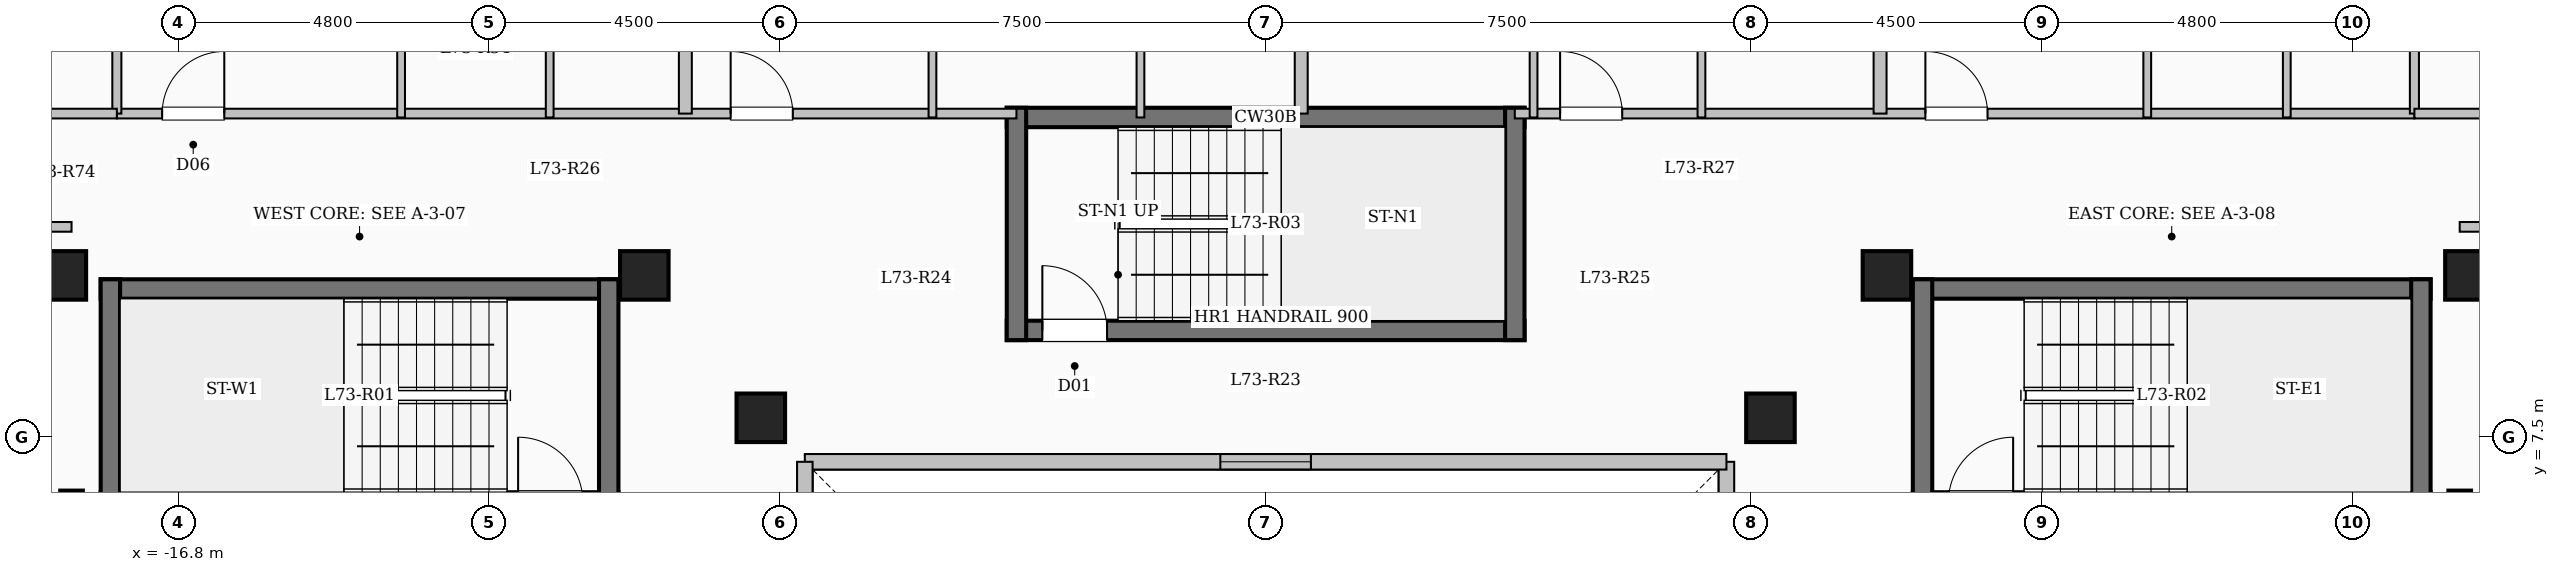
"""IFC4 building model, lengths in metres.
Left out: names, types, materials, properties, quantities, classifications, styles, units other than length and angle.
Written with IfcOpenShell. Run it as: python <this file> out.ifc"""

import sys

from ifc_helpers import new_model, si_unit, direction, frame, frame_2d, origin, origin_2d, place, context, subcontext, project, spatial, rectangle, extrude, element, fill, save


model = new_model("IFC4")
c1 = context("Model", 3, precision=1e-05, world=origin(), true_north=direction((0.0, 1.0)))
c2 = subcontext(c1, "Body", "Model", "MODEL_VIEW")
j1 = project(units=[si_unit("LENGTHUNIT", "METRE"), si_unit("PLANEANGLEUNIT", "RADIAN")], contexts=[c1])
p1 = place(None, origin())
s1 = spatial("IfcSite", under=j1, at=p1, CompositionType="ELEMENT")
p2 = place(p1, origin())
s2 = spatial("IfcBuilding", under=s1, at=p2, CompositionType="ELEMENT")
p3 = place(p2, frame((0.0, 0.0, 268.3)))
s3 = spatial("IfcBuildingStorey", under=s2, at=p3, CompositionType="ELEMENT", Elevation=268.3)
for number, where, z_axis, x_axis in (
    (1, (-7.8, 7.8, 0.0), (0.0, 0.0, 1.0), (1.0, 0.0, 0.0)),
    (2, (7.8, 7.8, 0.0), (0.0, 0.0, 1.0), (1.0, 0.0, 0.0)),
    (3, (-9.6, 10.0, 0.0), (0.0, 0.0, 1.0), (1.0, 0.0, 0.0)),
    (4, (9.6, 10.0, 0.0), (0.0, 0.0, 1.0), (1.0, 0.0, 0.0)),
    (5, (-18.6, 10.0, 0.0), (0.0, 0.0, 1.0), (1.0, 0.0, 0.0)),
    (6, (18.6, 10.0, 0.0), (0.0, 0.0, 1.0), (1.0, 0.0, 0.0)),
):
    element("IfcColumn", number, at=place(p3, frame(where, z_axis=z_axis, x_axis=x_axis)), inside=s3, PredefinedType="COLUMN", context=c2, shape_type="SweptSolid", body=[
        extrude(rectangle(XDim=0.75, YDim=0.75, at=origin_2d()), origin(), (0.0, 0.0, 1.0), 3.35),
    ])
p4 = place(p3, frame((7.12, -7.12, 0.0), z_axis=(0.0, 0.0, 1.0), x_axis=(0.0, 1.0, 0.0)))
e7 = element("IfcWall", 7, at=p4, inside=s3, PredefinedType="SOLIDWALL", context=c2, shape_type="SweptSolid", body=[
    extrude(rectangle(XDim=14.24, YDim=0.24, at=frame_2d((7.12, 0.0))), origin(), (0.0, 0.0, 1.0), 3.05),
])
p5 = place(p4, frame((6.42, 0.0, 0.95)))
e8 = element("IfcOpeningElement", 8, at=p5, cuts=e7, PredefinedType="OPENING", context=c2, shape_type="SweptSolid", body=[
    extrude(rectangle(XDim=1.4, YDim=1.5, at=frame_2d((0.7, 0.75))), frame((0.0, 0.13, 0.0), z_axis=(0.0, -1.0, 0.0), x_axis=(1.0, 0.0, 0.0)), (0.0, 0.0, 1.0), 0.26),
])
p6 = place(p3, frame((7.12, 7.12, 0.0), z_axis=(0.0, 0.0, 1.0), x_axis=(-1.0, 0.0, 0.0)))
e9 = element("IfcWall", 9, at=p6, inside=s3, PredefinedType="SOLIDWALL", context=c2, shape_type="SweptSolid", body=[
    extrude(rectangle(XDim=14.24, YDim=0.24, at=frame_2d((7.12, 0.0))), origin(), (0.0, 0.0, 1.0), 3.05),
])
p7 = place(p6, frame((6.42, 0.0, 0.95)))
e10 = element("IfcOpeningElement", 10, at=p7, cuts=e9, PredefinedType="OPENING", context=c2, shape_type="SweptSolid", body=[
    extrude(rectangle(XDim=1.4, YDim=1.5, at=frame_2d((0.7, 0.75))), frame((0.0, 0.13, 0.0), z_axis=(0.0, -1.0, 0.0), x_axis=(1.0, 0.0, 0.0)), (0.0, 0.0, 1.0), 0.26),
])
p8 = place(p3, frame((-7.12, 7.12, 0.0), z_axis=(0.0, 0.0, 1.0), x_axis=(0.0, -1.0, 0.0)))
e11 = element("IfcWall", 11, at=p8, inside=s3, PredefinedType="SOLIDWALL", context=c2, shape_type="SweptSolid", body=[
    extrude(rectangle(XDim=14.24, YDim=0.24, at=frame_2d((7.12, 0.0))), origin(), (0.0, 0.0, 1.0), 3.05),
])
p9 = place(p8, frame((6.42, 0.0, 0.95)))
e12 = element("IfcOpeningElement", 12, at=p9, cuts=e11, PredefinedType="OPENING", context=c2, shape_type="SweptSolid", body=[
    extrude(rectangle(XDim=1.4, YDim=1.5, at=frame_2d((0.7, 0.75))), frame((0.0, 0.13, 0.0), z_axis=(0.0, -1.0, 0.0), x_axis=(1.0, 0.0, 0.0)), (0.0, 0.0, 1.0), 0.26),
])
p10 = place(p3, frame((-18.0, 9.79, 0.0), z_axis=(0.0, 0.0, 1.0), x_axis=(1.0, 0.0, 0.0)))
e13 = element("IfcWall", 13, at=p10, inside=s3, PredefinedType="SHEAR", context=c2, shape_type="SweptSolid", body=[
    extrude(rectangle(XDim=8.0, YDim=0.3, at=frame_2d((4.0, 0.0))), origin(), (0.0, 0.0, 1.0), 3.35),
])
p11 = place(p3, frame((-18.0, 6.5, 0.0), z_axis=(0.0, 0.0, 1.0), x_axis=(1.0, 0.0, 0.0)))
e14 = element("IfcWall", 14, at=p11, inside=s3, PredefinedType="SHEAR", context=c2, shape_type="SweptSolid", body=[
    extrude(rectangle(XDim=8.0, YDim=0.3, at=frame_2d((4.0, 0.0))), origin(), (0.0, 0.0, 1.0), 3.35),
])
p12 = place(p11, frame((6.45, 0.0, 0.0)))
e15 = element("IfcOpeningElement", 15, at=p12, cuts=e14, PredefinedType="OPENING", context=c2, shape_type="SweptSolid", body=[
    extrude(rectangle(XDim=1.0, YDim=2.15, at=frame_2d((0.5, 1.075))), frame((0.0, 0.16, 0.0), z_axis=(0.0, -1.0, 0.0), x_axis=(1.0, 0.0, 0.0)), (0.0, 0.0, 1.0), 0.32),
])
for number, where, z_axis, x_axis in (
    (16, (-17.85, 6.35, 0.0), (0.0, 0.0, 1.0), (0.0, 1.0, 0.0)),
    (17, (-10.15, 6.35, 0.0), (0.0, 0.0, 1.0), (0.0, 1.0, 0.0)),
):
    element("IfcWall", number, at=place(p3, frame(where, z_axis=z_axis, x_axis=x_axis)), inside=s3, PredefinedType="SHEAR", context=c2, shape_type="SweptSolid", body=[
        extrude(rectangle(XDim=3.59, YDim=0.3, at=frame_2d((1.795, 0.0))), origin(), (0.0, 0.0, 1.0), 3.35),
    ])
p13 = place(p3, frame((10.0, 9.79, 0.0), z_axis=(0.0, 0.0, 1.0), x_axis=(1.0, 0.0, 0.0)))
e18 = element("IfcWall", 18, at=p13, inside=s3, PredefinedType="SHEAR", context=c2, shape_type="SweptSolid", body=[
    extrude(rectangle(XDim=8.0, YDim=0.3, at=frame_2d((4.0, 0.0))), origin(), (0.0, 0.0, 1.0), 3.35),
])
p14 = place(p3, frame((10.0, 6.5, 0.0), z_axis=(0.0, 0.0, 1.0), x_axis=(1.0, 0.0, 0.0)))
e19 = element("IfcWall", 19, at=p14, inside=s3, PredefinedType="SHEAR", context=c2, shape_type="SweptSolid", body=[
    extrude(rectangle(XDim=8.0, YDim=0.3, at=frame_2d((4.0, 0.0))), origin(), (0.0, 0.0, 1.0), 3.35),
])
p15 = place(p14, frame((0.55, 0.0, 0.0)))
e20 = element("IfcOpeningElement", 20, at=p15, cuts=e19, PredefinedType="OPENING", context=c2, shape_type="SweptSolid", body=[
    extrude(rectangle(XDim=1.0, YDim=2.15, at=frame_2d((0.5, 1.075))), frame((0.0, 0.16, 0.0), z_axis=(0.0, -1.0, 0.0), x_axis=(1.0, 0.0, 0.0)), (0.0, 0.0, 1.0), 0.32),
])
for number, where, z_axis, x_axis in (
    (21, (10.15, 6.35, 0.0), (0.0, 0.0, 1.0), (0.0, 1.0, 0.0)),
    (22, (17.85, 6.35, 0.0), (0.0, 0.0, 1.0), (0.0, 1.0, 0.0)),
):
    element("IfcWall", number, at=place(p3, frame(where, z_axis=z_axis, x_axis=x_axis)), inside=s3, PredefinedType="SHEAR", context=c2, shape_type="SweptSolid", body=[
        extrude(rectangle(XDim=3.59, YDim=0.3, at=frame_2d((1.795, 0.0))), origin(), (0.0, 0.0, 1.0), 3.35),
    ])
p16 = place(p3, frame((-4.0, 12.44, 0.0), z_axis=(0.0, 0.0, 1.0), x_axis=(1.0, 0.0, 0.0)))
e23 = element("IfcWall", 23, at=p16, inside=s3, PredefinedType="SHEAR", context=c2, shape_type="SweptSolid", body=[
    extrude(rectangle(XDim=8.0, YDim=0.3, at=frame_2d((4.0, 0.0))), origin(), (0.0, 0.0, 1.0), 3.35),
])
p17 = place(p3, frame((-4.0, 9.15, 0.0), z_axis=(0.0, 0.0, 1.0), x_axis=(1.0, 0.0, 0.0)))
e24 = element("IfcWall", 24, at=p17, inside=s3, PredefinedType="SHEAR", context=c2, shape_type="SweptSolid", body=[
    extrude(rectangle(XDim=8.0, YDim=0.3, at=frame_2d((4.0, 0.0))), origin(), (0.0, 0.0, 1.0), 3.35),
])
p18 = place(p17, frame((0.55, 0.0, 0.0)))
e25 = element("IfcOpeningElement", 25, at=p18, cuts=e24, PredefinedType="OPENING", context=c2, shape_type="SweptSolid", body=[
    extrude(rectangle(XDim=1.0, YDim=2.15, at=frame_2d((0.5, 1.075))), frame((0.0, 0.16, 0.0), z_axis=(0.0, -1.0, 0.0), x_axis=(1.0, 0.0, 0.0)), (0.0, 0.0, 1.0), 0.32),
])
for number, where, z_axis, x_axis in (
    (26, (-3.85, 9.0, 0.0), (0.0, 0.0, 1.0), (0.0, 1.0, 0.0)),
    (27, (3.85, 9.0, 0.0), (0.0, 0.0, 1.0), (0.0, 1.0, 0.0)),
):
    element("IfcWall", number, at=place(p3, frame(where, z_axis=z_axis, x_axis=x_axis)), inside=s3, PredefinedType="SHEAR", context=c2, shape_type="SweptSolid", body=[
        extrude(rectangle(XDim=3.59, YDim=0.3, at=frame_2d((1.795, 0.0))), origin(), (0.0, 0.0, 1.0), 3.35),
    ])
for number, where, z_axis, x_axis in (
    (28, (-18.45, -7.375, 0.0), (0.0, 0.0, 1.0), (0.0, 1.0, 0.0)),
    (29, (18.45, -7.375, 0.0), (0.0, 0.0, 1.0), (0.0, 1.0, 0.0)),
):
    element("IfcWall", number, at=place(p3, frame(where, z_axis=z_axis, x_axis=x_axis)), inside=s3, PredefinedType="SHEAR", context=c2, shape_type="SweptSolid", body=[
        extrude(rectangle(XDim=14.05, YDim=0.35, at=frame_2d((7.025, 0.0))), origin(), (0.0, 0.0, 1.0), 3.35),
    ])
p19 = place(p3, frame((-17.75, 12.5, 0.0), z_axis=(0.0, 0.0, 1.0), x_axis=(1.0, 0.0, 0.0)))
e30 = element("IfcWall", 30, at=p19, inside=s3, PredefinedType="PARTITIONING", context=c2, shape_type="SweptSolid", body=[
    extrude(rectangle(XDim=13.9, YDim=0.15, at=frame_2d((6.95, 0.0))), origin(), (0.0, 0.0, 1.0), 3.05),
])
p20 = place(p19, frame((0.7, 0.0, 0.0)))
e31 = element("IfcOpeningElement", 31, at=p20, cuts=e30, PredefinedType="OPENING", context=c2, shape_type="SweptSolid", body=[
    extrude(rectangle(XDim=0.96, YDim=2.15, at=frame_2d((0.48, 1.075))), frame((0.0, 0.085, 0.0), z_axis=(0.0, -1.0, 0.0), x_axis=(1.0, 0.0, 0.0)), (0.0, 0.0, 1.0), 0.17),
])
p21 = place(p19, frame((9.484, 0.0, 0.0)))
e32 = element("IfcOpeningElement", 32, at=p21, cuts=e30, PredefinedType="OPENING", context=c2, shape_type="SweptSolid", body=[
    extrude(rectangle(XDim=0.96, YDim=2.15, at=frame_2d((0.48, 1.075))), frame((0.0, 0.085, 0.0), z_axis=(0.0, -1.0, 0.0), x_axis=(1.0, 0.0, 0.0)), (0.0, 0.0, 1.0), 0.17),
])
p22 = place(p3, frame((3.85, 12.5, 0.0), z_axis=(0.0, 0.0, 1.0), x_axis=(1.0, 0.0, 0.0)))
e33 = element("IfcWall", 33, at=p22, inside=s3, PredefinedType="PARTITIONING", context=c2, shape_type="SweptSolid", body=[
    extrude(rectangle(XDim=13.9, YDim=0.15, at=frame_2d((6.95, 0.0))), origin(), (0.0, 0.0, 1.0), 3.05),
])
p23 = place(p22, frame((0.7, 0.0, 0.0)))
e34 = element("IfcOpeningElement", 34, at=p23, cuts=e33, PredefinedType="OPENING", context=c2, shape_type="SweptSolid", body=[
    extrude(rectangle(XDim=0.96, YDim=2.15, at=frame_2d((0.48, 1.075))), frame((0.0, 0.085, 0.0), z_axis=(0.0, -1.0, 0.0), x_axis=(1.0, 0.0, 0.0)), (0.0, 0.0, 1.0), 0.17),
])
p24 = place(p22, frame((6.344, 0.0, 0.0)))
e35 = element("IfcOpeningElement", 35, at=p24, cuts=e33, PredefinedType="OPENING", context=c2, shape_type="SweptSolid", body=[
    extrude(rectangle(XDim=0.96, YDim=2.15, at=frame_2d((0.48, 1.075))), frame((0.0, 0.085, 0.0), z_axis=(0.0, -1.0, 0.0), x_axis=(1.0, 0.0, 0.0)), (0.0, 0.0, 1.0), 0.17),
])
p25 = place(p3, frame((0.55, 12.5, 0.0), z_axis=(0.0, 0.0, 1.0), x_axis=(0.0, 1.0, 0.0)))
e36 = element("IfcWall", 36, at=p25, inside=s3, PredefinedType="SOLIDWALL", context=c2, shape_type="SweptSolid", body=[
    extrude(rectangle(XDim=9.88, YDim=0.2, at=frame_2d((4.94, 0.0))), origin(), (0.0, 0.0, 1.0), 3.05),
])
p26 = place(p3, frame((-8.966, 12.5, 0.0), z_axis=(0.0, 0.0, 1.0), x_axis=(0.0, 1.0, 0.0)))
e37 = element("IfcWall", 37, at=p26, inside=s3, PredefinedType="SOLIDWALL", context=c2, shape_type="SweptSolid", body=[
    extrude(rectangle(XDim=8.902, YDim=0.2, at=frame_2d((4.451, 0.0))), origin(), (0.0, 0.0, 1.0), 3.05),
])
p27 = place(p3, frame((-13.358, 12.44, 0.0), z_axis=(0.0, 0.0, 1.0), x_axis=(0.0, 1.0, 0.0)))
e38 = element("IfcWall", 38, at=p27, inside=s3, PredefinedType="PARTITIONING", context=c2, shape_type="SweptSolid", body=[
    extrude(rectangle(XDim=8.46, YDim=0.12, at=frame_2d((4.23, 0.0))), origin(), (0.0, 0.0, 1.0), 3.05),
])
p28 = place(p27, frame((2.905, 0.0, 0.0)))
e39 = element("IfcOpeningElement", 39, at=p28, cuts=e38, PredefinedType="OPENING", context=c2, shape_type="SweptSolid", body=[
    extrude(rectangle(XDim=1.08, YDim=2.15, at=frame_2d((0.54, 1.075))), frame((0.0, 0.07, 0.0), z_axis=(0.0, -1.0, 0.0), x_axis=(1.0, 0.0, 0.0)), (0.0, 0.0, 1.0), 0.14),
])
p29 = place(p3, frame((-11.062, 12.44, 0.0), z_axis=(0.0, 0.0, 1.0), x_axis=(0.0, 1.0, 0.0)))
e40 = element("IfcWall", 40, at=p29, inside=s3, PredefinedType="PARTITIONING", context=c2, shape_type="SweptSolid", body=[
    extrude(rectangle(XDim=2.62, YDim=0.12, at=frame_2d((1.31, 0.0))), origin(), (0.0, 0.0, 1.0), 3.05),
])
p30 = place(p3, frame((-5.148, 12.44, 0.0), z_axis=(0.0, 0.0, 1.0), x_axis=(0.0, 1.0, 0.0)))
e41 = element("IfcWall", 41, at=p30, inside=s3, PredefinedType="PARTITIONING", context=c2, shape_type="SweptSolid", body=[
    extrude(rectangle(XDim=9.903, YDim=0.12, at=frame_2d((4.952, 0.0))), origin(), (0.0, 0.0, 1.0), 3.05),
])
p31 = place(p30, frame((3.075, 0.0, 0.0)))
e42 = element("IfcOpeningElement", 42, at=p31, cuts=e41, PredefinedType="OPENING", context=c2, shape_type="SweptSolid", body=[
    extrude(rectangle(XDim=1.08, YDim=2.15, at=frame_2d((0.54, 1.075))), frame((0.0, 0.07, 0.0), z_axis=(0.0, -1.0, 0.0), x_axis=(1.0, 0.0, 0.0)), (0.0, 0.0, 1.0), 0.14),
])
p32 = place(p3, frame((-1.934, 12.44, 0.0), z_axis=(0.0, 0.0, 1.0), x_axis=(0.0, 1.0, 0.0)))
e43 = element("IfcWall", 43, at=p32, inside=s3, PredefinedType="PARTITIONING", context=c2, shape_type="SweptSolid", body=[
    extrude(rectangle(XDim=2.79, YDim=0.12, at=frame_2d((1.395, 0.0))), origin(), (0.0, 0.0, 1.0), 3.05),
])
p33 = place(p3, frame((9.494, 12.5, 0.0), z_axis=(0.0, 0.0, 1.0), x_axis=(0.0, 1.0, 0.0)))
e44 = element("IfcWall", 44, at=p33, inside=s3, PredefinedType="SOLIDWALL", context=c2, shape_type="SweptSolid", body=[
    extrude(rectangle(XDim=8.771, YDim=0.2, at=frame_2d((4.385, 0.0))), origin(), (0.0, 0.0, 1.0), 3.05),
])
p34 = place(p3, frame((4.14, 12.44, 0.0), z_axis=(0.0, 0.0, 1.0), x_axis=(0.0, 1.0, 0.0)))
e45 = element("IfcWall", 45, at=p34, inside=s3, PredefinedType="PARTITIONING", context=c2, shape_type="SweptSolid", body=[
    extrude(rectangle(XDim=9.94, YDim=0.12, at=frame_2d((4.97, 0.0))), origin(), (0.0, 0.0, 1.0), 3.05),
])
p35 = place(p34, frame((3.245, 0.0, 0.0)))
e46 = element("IfcOpeningElement", 46, at=p35, cuts=e45, PredefinedType="OPENING", context=c2, shape_type="SweptSolid", body=[
    extrude(rectangle(XDim=1.08, YDim=2.15, at=frame_2d((0.54, 1.075))), frame((0.0, 0.07, 0.0), z_axis=(0.0, -1.0, 0.0), x_axis=(1.0, 0.0, 0.0)), (0.0, 0.0, 1.0), 0.14),
])
p36 = place(p3, frame((6.734, 12.44, 0.0), z_axis=(0.0, 0.0, 1.0), x_axis=(0.0, 1.0, 0.0)))
e47 = element("IfcWall", 47, at=p36, inside=s3, PredefinedType="PARTITIONING", context=c2, shape_type="SweptSolid", body=[
    extrude(rectangle(XDim=2.96, YDim=0.12, at=frame_2d((1.48, 0.0))), origin(), (0.0, 0.0, 1.0), 3.05),
])
p37 = place(p3, frame((13.622, 12.44, 0.0), z_axis=(0.0, 0.0, 1.0), x_axis=(0.0, 1.0, 0.0)))
e48 = element("IfcWall", 48, at=p37, inside=s3, PredefinedType="PARTITIONING", context=c2, shape_type="SweptSolid", body=[
    extrude(rectangle(XDim=8.46, YDim=0.12, at=frame_2d((4.23, 0.0))), origin(), (0.0, 0.0, 1.0), 3.05),
])
p38 = place(p37, frame((2.735, 0.0, 0.0)))
e49 = element("IfcOpeningElement", 49, at=p38, cuts=e48, PredefinedType="OPENING", context=c2, shape_type="SweptSolid", body=[
    extrude(rectangle(XDim=1.08, YDim=2.15, at=frame_2d((0.54, 1.075))), frame((0.0, 0.07, 0.0), z_axis=(0.0, -1.0, 0.0), x_axis=(1.0, 0.0, 0.0)), (0.0, 0.0, 1.0), 0.14),
])
p39 = place(p3, frame((15.778, 12.44, 0.0), z_axis=(0.0, 0.0, 1.0), x_axis=(0.0, 1.0, 0.0)))
e50 = element("IfcWall", 50, at=p39, inside=s3, PredefinedType="PARTITIONING", context=c2, shape_type="SweptSolid", body=[
    extrude(rectangle(XDim=2.45, YDim=0.12, at=frame_2d((1.225, 0.0))), origin(), (0.0, 0.0, 1.0), 3.05),
])
for number, where, z_axis, x_axis in (
    (51, (-22.68, 10.75, 0.0), (0.0, 0.0, 1.0), (1.0, 0.0, 0.0)),
    (52, (18.45, 10.75, 0.0), (0.0, 0.0, 1.0), (1.0, 0.0, 0.0)),
):
    element("IfcWall", number, at=place(p3, frame(where, z_axis=z_axis, x_axis=x_axis)), inside=s3, PredefinedType="PARTITIONING", context=c2, shape_type="SweptSolid", body=[
        extrude(rectangle(XDim=4.23, YDim=0.15, at=frame_2d((2.115, 0.0))), origin(), (0.0, 0.0, 1.0), 3.05),
    ])
for number, where, z_axis, x_axis in (
    (53, (-17.75, 12.5, 0.0), (0.0, 0.0, 1.0), (0.0, 1.0, 0.0)),
    (54, (17.75, 12.5, 0.0), (0.0, 0.0, 1.0), (0.0, 1.0, 0.0)),
):
    element("IfcWall", number, at=place(p3, frame(where, z_axis=z_axis, x_axis=x_axis)), inside=s3, PredefinedType="PARTITIONING", context=c2, shape_type="SweptSolid", body=[
        extrude(rectangle(XDim=5.05, YDim=0.14, at=frame_2d((2.525, 0.0))), origin(), (0.0, 0.0, 1.0), 3.05),
    ])
p40 = place(p3, frame((-22.68, 12.5, 0.0), z_axis=(0.0, 0.0, 1.0), x_axis=(1.0, 0.0, 0.0)))
e55 = element("IfcWall", 55, at=p40, inside=s3, PredefinedType="PARTITIONING", context=c2, shape_type="SweptSolid", body=[
    extrude(rectangle(XDim=4.93, YDim=0.15, at=frame_2d((2.465, 0.0))), origin(), (0.0, 0.0, 1.0), 3.05),
])
p41 = place(p40, frame((1.99, 0.0, 0.0)))
e56 = element("IfcOpeningElement", 56, at=p41, cuts=e55, PredefinedType="OPENING", context=c2, shape_type="SweptSolid", body=[
    extrude(rectangle(XDim=0.95, YDim=2.15, at=frame_2d((0.475, 1.075))), frame((0.0, 0.085, 0.0), z_axis=(0.0, -1.0, 0.0), x_axis=(1.0, 0.0, 0.0)), (0.0, 0.0, 1.0), 0.17),
])
p42 = place(p3, frame((17.75, 12.5, 0.0), z_axis=(0.0, 0.0, 1.0), x_axis=(1.0, 0.0, 0.0)))
e57 = element("IfcWall", 57, at=p42, inside=s3, PredefinedType="PARTITIONING", context=c2, shape_type="SweptSolid", body=[
    extrude(rectangle(XDim=4.93, YDim=0.15, at=frame_2d((2.465, 0.0))), origin(), (0.0, 0.0, 1.0), 3.05),
])
p43 = place(p42, frame((1.99, 0.0, 0.0)))
e58 = element("IfcOpeningElement", 58, at=p43, cuts=e57, PredefinedType="OPENING", context=c2, shape_type="SweptSolid", body=[
    extrude(rectangle(XDim=0.95, YDim=2.15, at=frame_2d((0.475, 1.075))), frame((0.0, 0.085, 0.0), z_axis=(0.0, -1.0, 0.0), x_axis=(1.0, 0.0, 0.0)), (0.0, 0.0, 1.0), 0.17),
])
p44 = place(p7, origin())
e59 = element("IfcWindow", 59, at=p44, inside=s3, PartitioningType="SINGLE_PANEL", PredefinedType="WINDOW", context=c2, shape_type="SweptSolid", body=[
    extrude(rectangle(XDim=1.4, YDim=1.5, at=frame_2d((0.7, 0.75))), frame((0.0, 0.03, 0.0), z_axis=(0.0, -1.0, 0.0), x_axis=(1.0, 0.0, 0.0)), (0.0, 0.0, 1.0), 0.06),
])
fill(e10, e59)
p45 = place(p18, origin())
e60 = element("IfcDoor", 60, at=p45, inside=s3, OperationType="SINGLE_SWING_LEFT", PredefinedType="DOOR", context=c2, shape_type="SweptSolid", body=[
    extrude(rectangle(XDim=1.0, YDim=2.15, at=frame_2d((0.5, 1.075))), frame((0.0, 0.025, 0.0), z_axis=(0.0, -1.0, 0.0), x_axis=(1.0, 0.0, 0.0)), (0.0, 0.0, 1.0), 0.05),
])
fill(e25, e60)
p46 = place(p20, origin())
e61 = element("IfcDoor", 61, at=p46, inside=s3, OperationType="SINGLE_SWING_RIGHT", PredefinedType="DOOR", context=c2, shape_type="SweptSolid", body=[
    extrude(rectangle(XDim=0.96, YDim=2.15, at=frame_2d((0.48, 1.075))), frame((0.0, 0.025, 0.0), z_axis=(0.0, -1.0, 0.0), x_axis=(1.0, 0.0, 0.0)), (0.0, 0.0, 1.0), 0.05),
])
fill(e31, e61)
p47 = place(p21, origin())
e62 = element("IfcDoor", 62, at=p47, inside=s3, OperationType="SINGLE_SWING_LEFT", PredefinedType="DOOR", context=c2, shape_type="SweptSolid", body=[
    extrude(rectangle(XDim=0.96, YDim=2.15, at=frame_2d((0.48, 1.075))), frame((0.0, 0.025, 0.0), z_axis=(0.0, -1.0, 0.0), x_axis=(1.0, 0.0, 0.0)), (0.0, 0.0, 1.0), 0.05),
])
fill(e32, e62)
p48 = place(p23, origin())
e63 = element("IfcDoor", 63, at=p48, inside=s3, OperationType="SINGLE_SWING_LEFT", PredefinedType="DOOR", context=c2, shape_type="SweptSolid", body=[
    extrude(rectangle(XDim=0.96, YDim=2.15, at=frame_2d((0.48, 1.075))), frame((0.0, 0.025, 0.0), z_axis=(0.0, -1.0, 0.0), x_axis=(1.0, 0.0, 0.0)), (0.0, 0.0, 1.0), 0.05),
])
fill(e34, e63)
p49 = place(p24, origin())
e64 = element("IfcDoor", 64, at=p49, inside=s3, OperationType="SINGLE_SWING_LEFT", PredefinedType="DOOR", context=c2, shape_type="SweptSolid", body=[
    extrude(rectangle(XDim=0.96, YDim=2.15, at=frame_2d((0.48, 1.075))), frame((0.0, 0.025, 0.0), z_axis=(0.0, -1.0, 0.0), x_axis=(1.0, 0.0, 0.0)), (0.0, 0.0, 1.0), 0.05),
])
fill(e35, e64)
save(model, sys.argv[1])
